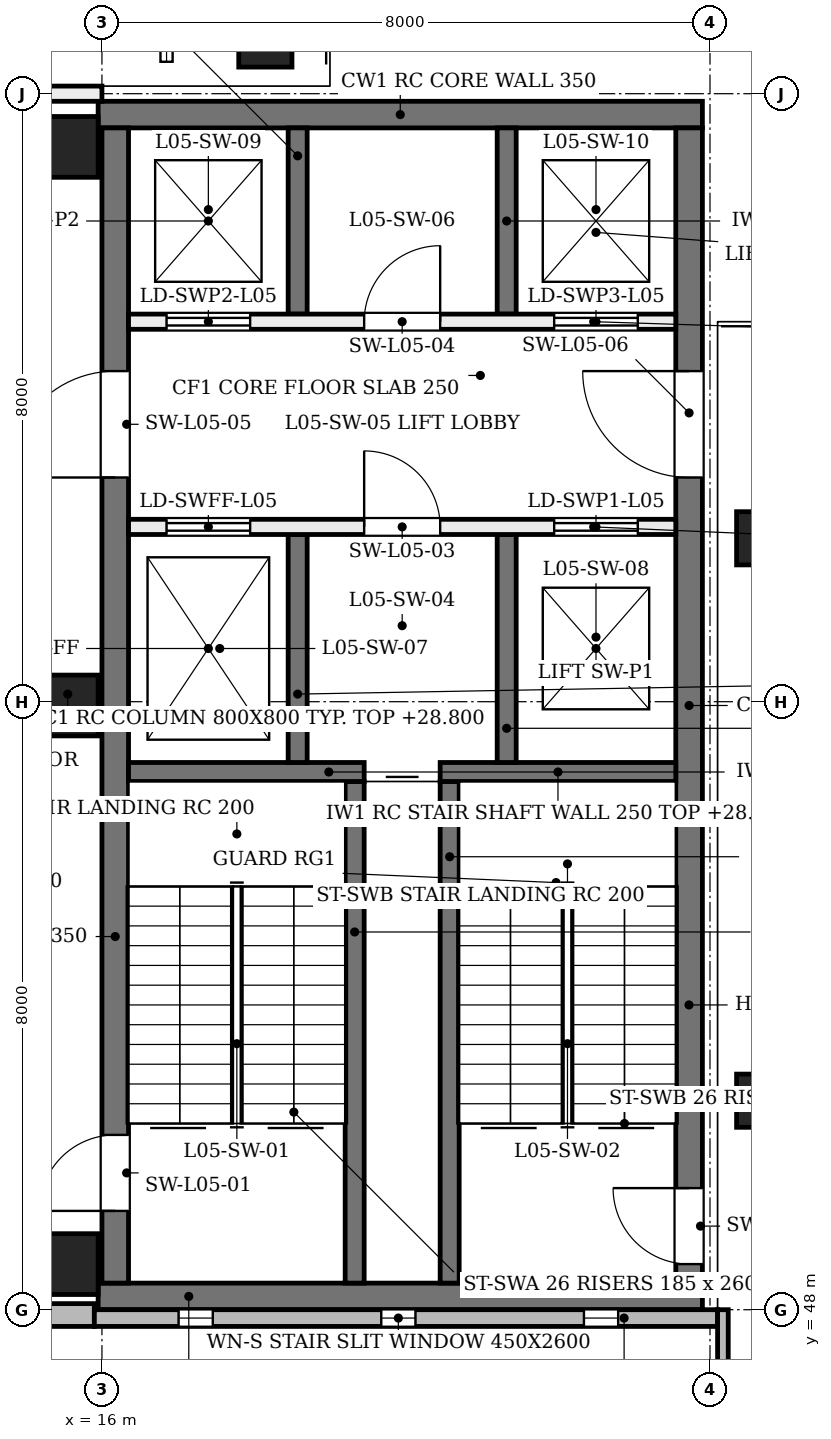
"""IFC4 building model, lengths in metres.
Left out: names, types, materials, properties, quantities, classifications, styles, units other than length and angle.
Written with IfcOpenShell. Run it as: python <this file> out.ifc"""

import sys

from ifc_helpers import new_model, si_unit, direction, frame, frame_2d, origin, origin_2d, place, context, subcontext, project, spatial, rectangle, extrude, element, fill, save


model = new_model("IFC4")
c1 = context("Model", 3, precision=1e-05, world=origin(), true_north=direction((0.0, 1.0)))
c2 = subcontext(c1, "Body", "Model", "MODEL_VIEW")
j1 = project(units=[si_unit("LENGTHUNIT", "METRE"), si_unit("PLANEANGLEUNIT", "RADIAN")], contexts=[c1])
p1 = place(None, origin())
s1 = spatial("IfcSite", under=j1, at=p1, CompositionType="ELEMENT")
p2 = place(p1, origin())
s2 = spatial("IfcBuilding", under=s1, at=p2, CompositionType="ELEMENT")
p3 = place(p2, frame((0.0, 0.0, 24.0)))
s3 = spatial("IfcBuildingStorey", under=s2, at=p3, CompositionType="ELEMENT", Elevation=24.0)
for number, where, z_axis, x_axis in (
    (1, (15.95, 48.175, 0.0), (0.0, 0.0, 1.0), (1.0, 0.0, 0.0)),
    (2, (15.95, 63.725, 0.0), (0.0, 0.0, 1.0), (1.0, 0.0, 0.0)),
):
    element("IfcWall", number, at=place(p3, frame(where, z_axis=z_axis, x_axis=x_axis)), inside=s3, PredefinedType="SHEAR", context=c2, shape_type="SweptSolid", body=[
        extrude(rectangle(XDim=7.95, YDim=0.35, at=frame_2d((3.975, 0.0))), origin(), (0.0, 0.0, 1.0), 4.58),
    ])
p4 = place(p3, frame((16.175, 48.35, 0.0), z_axis=(0.0, 0.0, 1.0), x_axis=(0.0, 1.0, 0.0)))
e3 = element("IfcWall", 3, at=p4, inside=s3, PredefinedType="SHEAR", context=c2, shape_type="SweptSolid", body=[
    extrude(rectangle(XDim=15.2, YDim=0.35, at=frame_2d((7.6, 0.0))), origin(), (0.0, 0.0, 1.0), 4.58),
])
p5 = place(p4, frame((0.95, 0.0, 0.0)))
e4 = element("IfcOpeningElement", 4, at=p5, cuts=e3, PredefinedType="OPENING", context=c2, shape_type="SweptSolid", body=[
    extrude(rectangle(XDim=1.0, YDim=2.1, at=frame_2d((0.5, 1.05))), frame((0.0, 0.185, 0.0), z_axis=(0.0, -1.0, 0.0), x_axis=(1.0, 0.0, 0.0)), (0.0, 0.0, 1.0), 0.37),
])
p6 = place(p4, frame((10.6, 0.0, 0.0)))
e5 = element("IfcOpeningElement", 5, at=p6, cuts=e3, PredefinedType="OPENING", context=c2, shape_type="SweptSolid", body=[
    extrude(rectangle(XDim=1.4, YDim=2.1, at=frame_2d((0.7, 1.05))), frame((0.0, 0.185, 0.0), z_axis=(0.0, -1.0, 0.0), x_axis=(1.0, 0.0, 0.0)), (0.0, 0.0, 1.0), 0.37),
])
p7 = place(p3, frame((23.725, 48.35, 0.0), z_axis=(0.0, 0.0, 1.0), x_axis=(0.0, 1.0, 0.0)))
e6 = element("IfcWall", 6, at=p7, inside=s3, PredefinedType="SHEAR", context=c2, shape_type="SweptSolid", body=[
    extrude(rectangle(XDim=15.2, YDim=0.35, at=frame_2d((7.6, 0.0))), origin(), (0.0, 0.0, 1.0), 4.58),
])
p8 = place(p7, frame((0.25, 0.0, 0.0)))
e7 = element("IfcOpeningElement", 7, at=p8, cuts=e6, PredefinedType="OPENING", context=c2, shape_type="SweptSolid", body=[
    extrude(rectangle(XDim=1.0, YDim=2.1, at=frame_2d((0.5, 1.05))), frame((0.0, 0.185, 0.0), z_axis=(0.0, -1.0, 0.0), x_axis=(1.0, 0.0, 0.0)), (0.0, 0.0, 1.0), 0.37),
])
p9 = place(p7, frame((10.6, 0.0, 0.0)))
e8 = element("IfcOpeningElement", 8, at=p9, cuts=e6, PredefinedType="OPENING", context=c2, shape_type="SweptSolid", body=[
    extrude(rectangle(XDim=1.4, YDim=2.1, at=frame_2d((0.7, 1.05))), frame((0.0, 0.185, 0.0), z_axis=(0.0, -1.0, 0.0), x_axis=(1.0, 0.0, 0.0)), (0.0, 0.0, 1.0), 0.37),
])
for number, where, z_axis, x_axis in (
    (9, (15.55, 48.6, 0.0), (0.0, 0.0, 1.0), (1.0, 0.0, 0.0)),
    (10, (15.55, 55.95, 0.0), (0.0, 0.0, 1.0), (1.0, 0.0, 0.0)),
    (11, (15.55, 63.3, 0.0), (0.0, 0.0, 1.0), (1.0, 0.0, 0.0)),
):
    element("IfcColumn", number, at=place(p3, frame(where, z_axis=z_axis, x_axis=x_axis)), inside=s3, PredefinedType="COLUMN", context=c2, shape_type="SweptSolid", body=[
        extrude(rectangle(XDim=0.8, YDim=0.8, at=origin_2d()), origin(), (0.0, 0.0, 1.0), 4.8),
    ])
for number, where, z_axis, x_axis in (
    (12, (24.7, 51.0, 0.0), (0.0, -0.204, 0.979), (1.0, 0.0, 0.0)),
    (13, (24.7, 58.4, 0.0), (0.0, -0.204, 0.979), (1.0, 0.0, 0.0)),
    (14, (18.4, 64.7, 0.0), (-0.204, 0.0, 0.979), (0.0, -1.0, 0.0)),
):
    element("IfcColumn", number, at=place(p3, frame(where, z_axis=z_axis, x_axis=x_axis)), inside=s3, PredefinedType="COLUMN", context=c2, shape_type="SweptSolid", body=[
        extrude(rectangle(XDim=0.7, YDim=0.7, at=origin_2d()), origin(), (0.0, 0.0, 1.0), 4.678),
    ])
p10 = place(p3, frame((8.0, 47.93, 0.0), z_axis=(0.0, 0.0, 1.0), x_axis=(1.0, 0.0, 0.0)))
e15 = element("IfcWall", 15, at=p10, inside=s3, PredefinedType="SOLIDWALL", context=c2, shape_type="SweptSolid", body=[
    extrude(rectangle(XDim=7.9, YDim=0.3, at=frame_2d((3.95, 0.0))), origin(), (0.0, 0.0, 1.0), 3.9),
])
p11 = place(p10, frame((0.717, 0.0, 0.75)))
e16 = element("IfcOpeningElement", 16, at=p11, cuts=e15, PredefinedType="OPENING", context=c2, shape_type="SweptSolid", body=[
    extrude(rectangle(XDim=1.2, YDim=3.1, at=frame_2d((0.6, 1.55))), frame((0.0, 0.16, 0.0), z_axis=(0.0, -1.0, 0.0), x_axis=(1.0, 0.0, 0.0)), (0.0, 0.0, 1.0), 0.32),
])
p12 = place(p10, frame((3.35, 0.0, 0.75)))
e17 = element("IfcOpeningElement", 17, at=p12, cuts=e15, PredefinedType="OPENING", context=c2, shape_type="SweptSolid", body=[
    extrude(rectangle(XDim=1.2, YDim=3.1, at=frame_2d((0.6, 1.55))), frame((0.0, 0.16, 0.0), z_axis=(0.0, -1.0, 0.0), x_axis=(1.0, 0.0, 0.0)), (0.0, 0.0, 1.0), 0.32),
])
p13 = place(p10, frame((5.983, 0.0, 0.75)))
e18 = element("IfcOpeningElement", 18, at=p13, cuts=e15, PredefinedType="OPENING", context=c2, shape_type="SweptSolid", body=[
    extrude(rectangle(XDim=1.2, YDim=3.1, at=frame_2d((0.6, 1.55))), frame((0.0, 0.16, 0.0), z_axis=(0.0, -1.0, 0.0), x_axis=(1.0, 0.0, 0.0)), (0.0, 0.0, 1.0), 0.32),
])
p14 = place(p3, frame((15.9, 47.89, 0.0), z_axis=(0.0, 0.0, 1.0), x_axis=(1.0, 0.0, 0.0)))
e19 = element("IfcWall", 19, at=p14, inside=s3, PredefinedType="SOLIDWALL", context=c2, shape_type="SweptSolid", body=[
    extrude(rectangle(XDim=8.2, YDim=0.22, at=frame_2d((4.1, 0.0))), origin(), (0.0, 0.0, 1.0), 3.9),
])
p15 = place(p14, frame((1.108, 0.0, 0.9)))
e20 = element("IfcOpeningElement", 20, at=p15, cuts=e19, PredefinedType="OPENING", context=c2, shape_type="SweptSolid", body=[
    extrude(rectangle(XDim=0.45, YDim=2.6, at=frame_2d((0.225, 1.3))), frame((0.0, 0.12, 0.0), z_axis=(0.0, -1.0, 0.0), x_axis=(1.0, 0.0, 0.0)), (0.0, 0.0, 1.0), 0.24),
])
p16 = place(p14, frame((3.775, 0.0, 0.9)))
e21 = element("IfcOpeningElement", 21, at=p16, cuts=e19, PredefinedType="OPENING", context=c2, shape_type="SweptSolid", body=[
    extrude(rectangle(XDim=0.45, YDim=2.6, at=frame_2d((0.225, 1.3))), frame((0.0, 0.12, 0.0), z_axis=(0.0, -1.0, 0.0), x_axis=(1.0, 0.0, 0.0)), (0.0, 0.0, 1.0), 0.24),
])
p17 = place(p14, frame((6.442, 0.0, 0.9)))
e22 = element("IfcOpeningElement", 22, at=p17, cuts=e19, PredefinedType="OPENING", context=c2, shape_type="SweptSolid", body=[
    extrude(rectangle(XDim=0.45, YDim=2.6, at=frame_2d((0.225, 1.3))), frame((0.0, 0.12, 0.0), z_axis=(0.0, -1.0, 0.0), x_axis=(1.0, 0.0, 0.0)), (0.0, 0.0, 1.0), 0.24),
])
p18 = place(p3, frame((24.17, 43.0, 0.0), z_axis=(0.0, 0.0, 1.0), x_axis=(0.0, 1.0, 0.0)))
e23 = element("IfcWall", 23, at=p18, inside=s3, PredefinedType="SOLIDWALL", context=c2, shape_type="SweptSolid", body=[
    extrude(rectangle(XDim=5.0, YDim=0.14, at=frame_2d((2.5, 0.0))), origin(), (0.0, 0.0, 1.0), 3.9),
])
for number, where, z_axis, x_axis in (
    (24, (19.325, 48.35, 0.0), (0.0, 0.0, 1.0), (0.0, 1.0, 0.0)),
    (25, (20.575, 48.35, 0.0), (0.0, 0.0, 1.0), (0.0, 1.0, 0.0)),
):
    element("IfcWall", number, at=place(p3, frame(where, z_axis=z_axis, x_axis=x_axis)), inside=s3, PredefinedType="SOLIDWALL", context=c2, shape_type="SweptSolid", body=[
        extrude(rectangle(XDim=6.6, YDim=0.25, at=frame_2d((3.3, 0.0))), origin(), (0.0, 0.0, 1.0), 4.55),
    ])
p19 = place(p3, frame((16.35, 55.075, 0.0), z_axis=(0.0, 0.0, 1.0), x_axis=(1.0, 0.0, 0.0)))
e26 = element("IfcWall", 26, at=p19, inside=s3, PredefinedType="SOLIDWALL", context=c2, shape_type="SweptSolid", body=[
    extrude(rectangle(XDim=3.1, YDim=0.25, at=frame_2d((1.55, 0.0))), origin(), (0.0, 0.0, 1.0), 4.55),
])
p20 = place(p3, frame((20.45, 55.075, 0.0), z_axis=(0.0, 0.0, 1.0), x_axis=(1.0, 0.0, 0.0)))
e27 = element("IfcWall", 27, at=p20, inside=s3, PredefinedType="SOLIDWALL", context=c2, shape_type="SweptSolid", body=[
    extrude(rectangle(XDim=3.1, YDim=0.25, at=frame_2d((1.55, 0.0))), origin(), (0.0, 0.0, 1.0), 4.55),
])
p21 = place(p3, frame((18.575, 55.2, 0.0), z_axis=(0.0, 0.0, 1.0), x_axis=(0.0, 1.0, 0.0)))
e28 = element("IfcWall", 28, at=p21, inside=s3, PredefinedType="SOLIDWALL", context=c2, shape_type="SweptSolid", body=[
    extrude(rectangle(XDim=3.0, YDim=0.25, at=frame_2d((1.5, 0.0))), origin(), (0.0, 0.0, 1.0), 4.55),
])
p22 = place(p3, frame((18.575, 61.1, 0.0), z_axis=(0.0, 0.0, 1.0), x_axis=(0.0, 1.0, 0.0)))
e29 = element("IfcWall", 29, at=p22, inside=s3, PredefinedType="SOLIDWALL", context=c2, shape_type="SweptSolid", body=[
    extrude(rectangle(XDim=2.45, YDim=0.25, at=frame_2d((1.225, 0.0))), origin(), (0.0, 0.0, 1.0), 4.55),
])
p23 = place(p3, frame((21.325, 55.2, 0.0), z_axis=(0.0, 0.0, 1.0), x_axis=(0.0, 1.0, 0.0)))
e30 = element("IfcWall", 30, at=p23, inside=s3, PredefinedType="SOLIDWALL", context=c2, shape_type="SweptSolid", body=[
    extrude(rectangle(XDim=3.0, YDim=0.25, at=frame_2d((1.5, 0.0))), origin(), (0.0, 0.0, 1.0), 4.55),
])
p24 = place(p3, frame((21.325, 61.1, 0.0), z_axis=(0.0, 0.0, 1.0), x_axis=(0.0, 1.0, 0.0)))
e31 = element("IfcWall", 31, at=p24, inside=s3, PredefinedType="SOLIDWALL", context=c2, shape_type="SweptSolid", body=[
    extrude(rectangle(XDim=2.45, YDim=0.25, at=frame_2d((1.225, 0.0))), origin(), (0.0, 0.0, 1.0), 4.55),
])
p25 = place(p3, frame((16.35, 58.3, 0.0), z_axis=(0.0, 0.0, 1.0), x_axis=(1.0, 0.0, 0.0)))
e32 = element("IfcWall", 32, at=p25, inside=s3, PredefinedType="SOLIDWALL", context=c2, shape_type="SweptSolid", body=[
    extrude(rectangle(XDim=7.2, YDim=0.2, at=frame_2d((3.6, 0.0))), origin(), (0.0, 0.0, 1.0), 4.55),
])
p26 = place(p25, frame((0.5, 0.0, 0.0)))
e33 = element("IfcOpeningElement", 33, at=p26, cuts=e32, PredefinedType="OPENING", context=c2, shape_type="SweptSolid", body=[
    extrude(rectangle(XDim=1.1, YDim=2.1, at=frame_2d((0.55, 1.05))), frame((0.0, 0.11, 0.0), z_axis=(0.0, -1.0, 0.0), x_axis=(1.0, 0.0, 0.0)), (0.0, 0.0, 1.0), 0.22),
])
p27 = place(p25, frame((5.6, 0.0, 0.0)))
e34 = element("IfcOpeningElement", 34, at=p27, cuts=e32, PredefinedType="OPENING", context=c2, shape_type="SweptSolid", body=[
    extrude(rectangle(XDim=1.1, YDim=2.1, at=frame_2d((0.55, 1.05))), frame((0.0, 0.11, 0.0), z_axis=(0.0, -1.0, 0.0), x_axis=(1.0, 0.0, 0.0)), (0.0, 0.0, 1.0), 0.22),
])
p28 = place(p25, frame((3.1, 0.0, 0.0)))
e35 = element("IfcOpeningElement", 35, at=p28, cuts=e32, PredefinedType="OPENING", context=c2, shape_type="SweptSolid", body=[
    extrude(rectangle(XDim=1.0, YDim=2.1, at=frame_2d((0.5, 1.05))), frame((0.0, 0.11, 0.0), z_axis=(0.0, -1.0, 0.0), x_axis=(1.0, 0.0, 0.0)), (0.0, 0.0, 1.0), 0.22),
])
p29 = place(p3, frame((16.35, 61.0, 0.0), z_axis=(0.0, 0.0, 1.0), x_axis=(1.0, 0.0, 0.0)))
e36 = element("IfcWall", 36, at=p29, inside=s3, PredefinedType="SOLIDWALL", context=c2, shape_type="SweptSolid", body=[
    extrude(rectangle(XDim=7.2, YDim=0.2, at=frame_2d((3.6, 0.0))), origin(), (0.0, 0.0, 1.0), 4.55),
])
p30 = place(p29, frame((0.5, 0.0, 0.0)))
e37 = element("IfcOpeningElement", 37, at=p30, cuts=e36, PredefinedType="OPENING", context=c2, shape_type="SweptSolid", body=[
    extrude(rectangle(XDim=1.1, YDim=2.1, at=frame_2d((0.55, 1.05))), frame((0.0, 0.11, 0.0), z_axis=(0.0, -1.0, 0.0), x_axis=(1.0, 0.0, 0.0)), (0.0, 0.0, 1.0), 0.22),
])
p31 = place(p29, frame((5.6, 0.0, 0.0)))
e38 = element("IfcOpeningElement", 38, at=p31, cuts=e36, PredefinedType="OPENING", context=c2, shape_type="SweptSolid", body=[
    extrude(rectangle(XDim=1.1, YDim=2.1, at=frame_2d((0.55, 1.05))), frame((0.0, 0.11, 0.0), z_axis=(0.0, -1.0, 0.0), x_axis=(1.0, 0.0, 0.0)), (0.0, 0.0, 1.0), 0.22),
])
p32 = place(p29, frame((3.1, 0.0, 0.0)))
e39 = element("IfcOpeningElement", 39, at=p32, cuts=e36, PredefinedType="OPENING", context=c2, shape_type="SweptSolid", body=[
    extrude(rectangle(XDim=1.0, YDim=2.1, at=frame_2d((0.5, 1.05))), frame((0.0, 0.11, 0.0), z_axis=(0.0, -1.0, 0.0), x_axis=(1.0, 0.0, 0.0)), (0.0, 0.0, 1.0), 0.22),
])
p33 = place(p3, frame((12.4, 64.0, 0.0), z_axis=(0.0, 0.0, 1.0), x_axis=(1.0, 0.0, 0.0)))
e40 = element("IfcWall", 40, at=p33, inside=s3, PredefinedType="PARTITIONING", context=c2, shape_type="SweptSolid", body=[
    extrude(rectangle(XDim=3.6, YDim=0.2, at=frame_2d((1.8, 0.0))), origin(), (0.0, 0.0, 1.0), 3.88),
])
p34 = place(p33, frame((1.0, 0.0, 0.0)))
e41 = element("IfcOpeningElement", 41, at=p34, cuts=e40, PredefinedType="OPENING", context=c2, shape_type="SweptSolid", body=[
    extrude(rectangle(XDim=1.6, YDim=2.1, at=frame_2d((0.8, 1.05))), frame((0.0, 0.11, 0.0), z_axis=(0.0, -1.0, 0.0), x_axis=(1.0, 0.0, 0.0)), (0.0, 0.0, 1.0), 0.22),
])
p35 = place(p15, origin())
e42 = element("IfcWindow", 42, at=p35, inside=s3, PartitioningType="SINGLE_PANEL", PredefinedType="WINDOW", context=c2, shape_type="SweptSolid", body=[
    extrude(rectangle(XDim=0.45, YDim=2.6, at=frame_2d((0.225, 1.3))), frame((0.0, 0.03, 0.0), z_axis=(0.0, -1.0, 0.0), x_axis=(1.0, 0.0, 0.0)), (0.0, 0.0, 1.0), 0.06),
])
fill(e20, e42)
p36 = place(p16, origin())
e43 = element("IfcWindow", 43, at=p36, inside=s3, PartitioningType="SINGLE_PANEL", PredefinedType="WINDOW", context=c2, shape_type="SweptSolid", body=[
    extrude(rectangle(XDim=0.45, YDim=2.6, at=frame_2d((0.225, 1.3))), frame((0.0, 0.03, 0.0), z_axis=(0.0, -1.0, 0.0), x_axis=(1.0, 0.0, 0.0)), (0.0, 0.0, 1.0), 0.06),
])
fill(e21, e43)
p37 = place(p17, origin())
e44 = element("IfcWindow", 44, at=p37, inside=s3, PartitioningType="SINGLE_PANEL", PredefinedType="WINDOW", context=c2, shape_type="SweptSolid", body=[
    extrude(rectangle(XDim=0.45, YDim=2.6, at=frame_2d((0.225, 1.3))), frame((0.0, 0.03, 0.0), z_axis=(0.0, -1.0, 0.0), x_axis=(1.0, 0.0, 0.0)), (0.0, 0.0, 1.0), 0.06),
])
fill(e22, e44)
p38 = place(p5, origin())
e45 = element("IfcDoor", 45, at=p38, inside=s3, OperationType="SINGLE_SWING_LEFT", PredefinedType="DOOR", context=c2, shape_type="SweptSolid", body=[
    extrude(rectangle(XDim=1.0, YDim=2.1, at=frame_2d((0.5, 1.05))), frame((0.0, 0.025, 0.0), z_axis=(0.0, -1.0, 0.0), x_axis=(1.0, 0.0, 0.0)), (0.0, 0.0, 1.0), 0.05),
])
fill(e4, e45)
p39 = place(p8, frame((1.0, 0.0, 0.0), z_axis=(0.0, 0.0, 1.0), x_axis=(-1.0, 0.0, 0.0)))
e46 = element("IfcDoor", 46, at=p39, inside=s3, OperationType="SINGLE_SWING_RIGHT", PredefinedType="DOOR", context=c2, shape_type="SweptSolid", body=[
    extrude(rectangle(XDim=1.0, YDim=2.1, at=frame_2d((0.5, 1.05))), frame((0.0, 0.025, 0.0), z_axis=(0.0, -1.0, 0.0), x_axis=(1.0, 0.0, 0.0)), (0.0, 0.0, 1.0), 0.05),
])
fill(e7, e46)
p40 = place(p26, origin())
e47 = element("IfcDoor", 47, at=p40, inside=s3, OperationType="DOUBLE_DOOR_SLIDING", PredefinedType="DOOR", context=c2, shape_type="SweptSolid", body=[
    extrude(rectangle(XDim=1.1, YDim=2.1, at=frame_2d((0.55, 1.05))), frame((0.0, 0.025, 0.0), z_axis=(0.0, -1.0, 0.0), x_axis=(1.0, 0.0, 0.0)), (0.0, 0.0, 1.0), 0.05),
])
fill(e33, e47)
p41 = place(p27, origin())
e48 = element("IfcDoor", 48, at=p41, inside=s3, OperationType="DOUBLE_DOOR_SLIDING", PredefinedType="DOOR", context=c2, shape_type="SweptSolid", body=[
    extrude(rectangle(XDim=1.1, YDim=2.1, at=frame_2d((0.55, 1.05))), frame((0.0, 0.025, 0.0), z_axis=(0.0, -1.0, 0.0), x_axis=(1.0, 0.0, 0.0)), (0.0, 0.0, 1.0), 0.05),
])
fill(e34, e48)
p42 = place(p30, frame((1.1, 0.0, 0.0), z_axis=(0.0, 0.0, 1.0), x_axis=(-1.0, 0.0, 0.0)))
e49 = element("IfcDoor", 49, at=p42, inside=s3, OperationType="DOUBLE_DOOR_SLIDING", PredefinedType="DOOR", context=c2, shape_type="SweptSolid", body=[
    extrude(rectangle(XDim=1.1, YDim=2.1, at=frame_2d((0.55, 1.05))), frame((0.0, 0.025, 0.0), z_axis=(0.0, -1.0, 0.0), x_axis=(1.0, 0.0, 0.0)), (0.0, 0.0, 1.0), 0.05),
])
fill(e37, e49)
p43 = place(p31, frame((1.1, 0.0, 0.0), z_axis=(0.0, 0.0, 1.0), x_axis=(-1.0, 0.0, 0.0)))
e50 = element("IfcDoor", 50, at=p43, inside=s3, OperationType="DOUBLE_DOOR_SLIDING", PredefinedType="DOOR", context=c2, shape_type="SweptSolid", body=[
    extrude(rectangle(XDim=1.1, YDim=2.1, at=frame_2d((0.55, 1.05))), frame((0.0, 0.025, 0.0), z_axis=(0.0, -1.0, 0.0), x_axis=(1.0, 0.0, 0.0)), (0.0, 0.0, 1.0), 0.05),
])
fill(e38, e50)
p44 = place(p28, origin())
e51 = element("IfcDoor", 51, at=p44, inside=s3, OperationType="SINGLE_SWING_LEFT", PredefinedType="DOOR", context=c2, shape_type="SweptSolid", body=[
    extrude(rectangle(XDim=1.0, YDim=2.1, at=frame_2d((0.5, 1.05))), frame((0.0, 0.025, 0.0), z_axis=(0.0, -1.0, 0.0), x_axis=(1.0, 0.0, 0.0)), (0.0, 0.0, 1.0), 0.05),
])
fill(e35, e51)
p45 = place(p32, frame((1.0, 0.0, 0.0), z_axis=(0.0, 0.0, 1.0), x_axis=(-1.0, 0.0, 0.0)))
e52 = element("IfcDoor", 52, at=p45, inside=s3, OperationType="SINGLE_SWING_RIGHT", PredefinedType="DOOR", context=c2, shape_type="SweptSolid", body=[
    extrude(rectangle(XDim=1.0, YDim=2.1, at=frame_2d((0.5, 1.05))), frame((0.0, 0.025, 0.0), z_axis=(0.0, -1.0, 0.0), x_axis=(1.0, 0.0, 0.0)), (0.0, 0.0, 1.0), 0.05),
])
fill(e39, e52)
p46 = place(p6, origin())
e53 = element("IfcDoor", 53, at=p46, inside=s3, OperationType="SINGLE_SWING_LEFT", PredefinedType="DOOR", context=c2, shape_type="SweptSolid", body=[
    extrude(rectangle(XDim=1.4, YDim=2.1, at=frame_2d((0.7, 1.05))), frame((0.0, 0.025, 0.0), z_axis=(0.0, -1.0, 0.0), x_axis=(1.0, 0.0, 0.0)), (0.0, 0.0, 1.0), 0.05),
])
fill(e5, e53)
p47 = place(p9, frame((1.4, 0.0, 0.0), z_axis=(0.0, 0.0, 1.0), x_axis=(-1.0, 0.0, 0.0)))
e54 = element("IfcDoor", 54, at=p47, inside=s3, OperationType="SINGLE_SWING_RIGHT", PredefinedType="DOOR", context=c2, shape_type="SweptSolid", body=[
    extrude(rectangle(XDim=1.4, YDim=2.1, at=frame_2d((0.7, 1.05))), frame((0.0, 0.025, 0.0), z_axis=(0.0, -1.0, 0.0), x_axis=(1.0, 0.0, 0.0)), (0.0, 0.0, 1.0), 0.05),
])
fill(e8, e54)
save(model, sys.argv[1])
